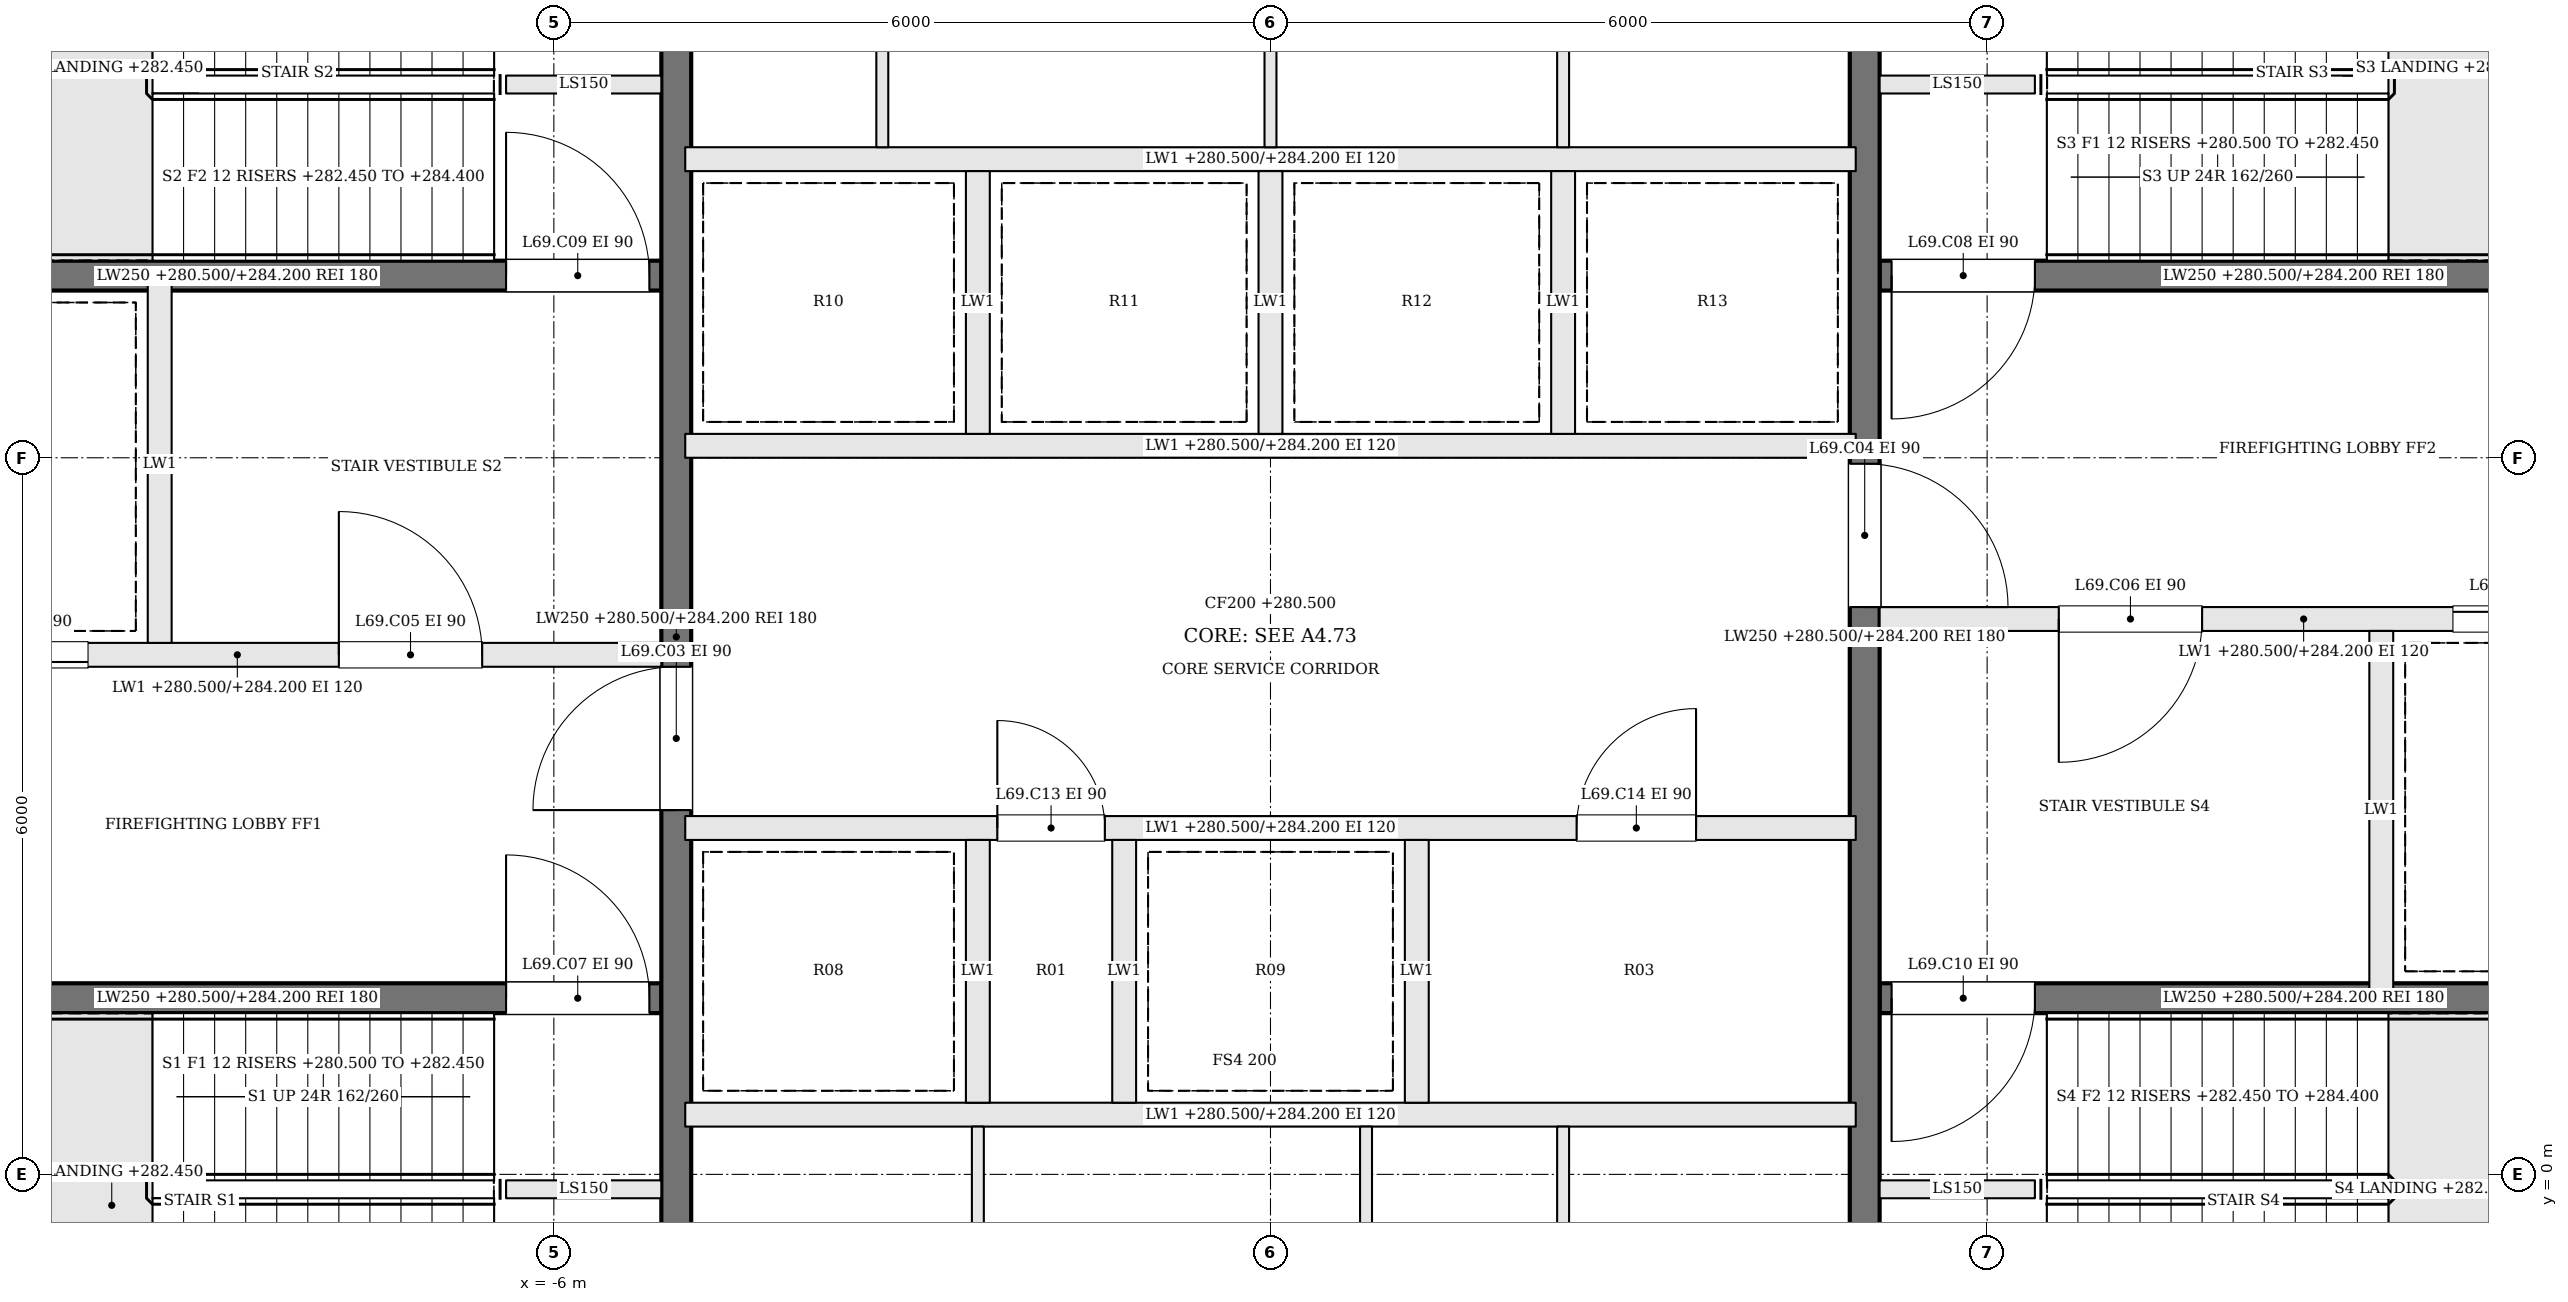
"""IFC4 building model, lengths in metres.
Left out: names, types, materials, properties, quantities, classifications, styles, units other than length and angle.
Written with IfcOpenShell. Run it as: python <this file> out.ifc"""

import sys

from ifc_helpers import new_model, si_unit, direction, frame, frame_2d, origin, place, context, subcontext, project, spatial, rectangle, extrude, element, fill, save


model = new_model("IFC4")
c1 = context("Model", 3, precision=1e-05, world=origin(), true_north=direction((0.0, 1.0)))
c2 = subcontext(c1, "Body", "Model", "MODEL_VIEW")
j1 = project(units=[si_unit("LENGTHUNIT", "METRE"), si_unit("PLANEANGLEUNIT", "RADIAN")], contexts=[c1])
p1 = place(None, origin())
s1 = spatial("IfcSite", under=j1, at=p1, CompositionType="ELEMENT")
p2 = place(p1, origin())
s2 = spatial("IfcBuilding", under=s1, at=p2, CompositionType="ELEMENT")
p3 = place(p2, frame((0.0, 0.0, 280.5)))
s3 = spatial("IfcBuildingStorey", under=s2, at=p3, CompositionType="ELEMENT", Elevation=280.5)
for number, where, z_axis, x_axis in (
    (1, (-6.4, -0.125, 0.0), (0.0, 0.0, 1.0), (1.0, 0.0, 0.0)),
    (2, (6.4, 9.125, 0.0), (0.0, 0.0, 1.0), (-1.0, 0.0, 0.0)),
    (3, (-6.4, 9.125, 0.0), (0.0, 0.0, 1.0), (1.0, 0.0, 0.0)),
    (4, (6.4, -0.125, 0.0), (0.0, 0.0, 1.0), (-1.0, 0.0, 0.0)),
):
    element("IfcWall", number, at=place(p3, frame(where, z_axis=z_axis, x_axis=x_axis)), inside=s3, PredefinedType="SOLIDWALL", context=c2, shape_type="SweptSolid", body=[
        extrude(rectangle(XDim=1.3, YDim=0.15, at=frame_2d((0.65, 0.0))), origin(), (0.0, 0.0, 1.0), 3.7),
    ])
p4 = place(p3, frame((-12.2, 1.475, 0.0), z_axis=(0.0, 0.0, 1.0), x_axis=(1.0, 0.0, 0.0)))
e5 = element("IfcWall", 5, at=p4, inside=s3, PredefinedType="SOLIDWALL", context=c2, shape_type="SweptSolid", body=[
    extrude(rectangle(XDim=7.1, YDim=0.25, at=frame_2d((3.55, 0.0))), origin(), (0.0, 0.0, 1.0), 3.7),
])
p5 = place(p4, frame((5.8, 0.0, 0.0)))
e6 = element("IfcOpeningElement", 6, at=p5, cuts=e5, PredefinedType="OPENING", context=c2, shape_type="SweptSolid", body=[
    extrude(rectangle(XDim=1.2, YDim=2.1, at=frame_2d((0.6, 1.05))), frame((0.0, 0.135, 0.0), z_axis=(0.0, -1.0, 0.0), x_axis=(1.0, 0.0, 0.0)), (0.0, 0.0, 1.0), 0.27),
])
p6 = place(p3, frame((12.2, 7.525, 0.0), z_axis=(0.0, 0.0, 1.0), x_axis=(-1.0, 0.0, 0.0)))
e7 = element("IfcWall", 7, at=p6, inside=s3, PredefinedType="SOLIDWALL", context=c2, shape_type="SweptSolid", body=[
    extrude(rectangle(XDim=7.1, YDim=0.25, at=frame_2d((3.55, 0.0))), origin(), (0.0, 0.0, 1.0), 3.7),
])
p7 = place(p6, frame((5.8, 0.0, 0.0)))
e8 = element("IfcOpeningElement", 8, at=p7, cuts=e7, PredefinedType="OPENING", context=c2, shape_type="SweptSolid", body=[
    extrude(rectangle(XDim=1.2, YDim=2.1, at=frame_2d((0.6, 1.05))), frame((0.0, 0.135, 0.0), z_axis=(0.0, -1.0, 0.0), x_axis=(1.0, 0.0, 0.0)), (0.0, 0.0, 1.0), 0.27),
])
p8 = place(p3, frame((-12.2, 4.35, 0.0), z_axis=(0.0, 0.0, 1.0), x_axis=(1.0, 0.0, 0.0)))
e9 = element("IfcWall", 9, at=p8, inside=s3, PredefinedType="SOLIDWALL", context=c2, shape_type="SweptSolid", body=[
    extrude(rectangle(XDim=7.1, YDim=0.2, at=frame_2d((3.55, 0.0))), origin(), (0.0, 0.0, 1.0), 3.7),
])
p9 = place(p8, frame((4.4, 0.0, 0.0)))
e10 = element("IfcOpeningElement", 10, at=p9, cuts=e9, PredefinedType="OPENING", context=c2, shape_type="SweptSolid", body=[
    extrude(rectangle(XDim=1.2, YDim=2.1, at=frame_2d((0.6, 1.05))), frame((0.0, 0.11, 0.0), z_axis=(0.0, -1.0, 0.0), x_axis=(1.0, 0.0, 0.0)), (0.0, 0.0, 1.0), 0.22),
])
p10 = place(p8, frame((1.1, 0.0, 0.0)))
e11 = element("IfcOpeningElement", 11, at=p10, cuts=e9, PredefinedType="OPENING", context=c2, shape_type="SweptSolid", body=[
    extrude(rectangle(XDim=1.2, YDim=2.1, at=frame_2d((0.6, 1.05))), frame((0.0, 0.11, 0.0), z_axis=(0.0, -1.0, 0.0), x_axis=(1.0, 0.0, 0.0)), (0.0, 0.0, 1.0), 0.22),
])
p11 = place(p3, frame((12.2, 4.65, 0.0), z_axis=(0.0, 0.0, 1.0), x_axis=(-1.0, 0.0, 0.0)))
e12 = element("IfcWall", 12, at=p11, inside=s3, PredefinedType="SOLIDWALL", context=c2, shape_type="SweptSolid", body=[
    extrude(rectangle(XDim=7.1, YDim=0.2, at=frame_2d((3.55, 0.0))), origin(), (0.0, 0.0, 1.0), 3.7),
])
p12 = place(p11, frame((4.4, 0.0, 0.0)))
e13 = element("IfcOpeningElement", 13, at=p12, cuts=e12, PredefinedType="OPENING", context=c2, shape_type="SweptSolid", body=[
    extrude(rectangle(XDim=1.2, YDim=2.1, at=frame_2d((0.6, 1.05))), frame((0.0, 0.11, 0.0), z_axis=(0.0, -1.0, 0.0), x_axis=(1.0, 0.0, 0.0)), (0.0, 0.0, 1.0), 0.22),
])
p13 = place(p11, frame((1.1, 0.0, 0.0)))
e14 = element("IfcOpeningElement", 14, at=p13, cuts=e12, PredefinedType="OPENING", context=c2, shape_type="SweptSolid", body=[
    extrude(rectangle(XDim=1.2, YDim=2.1, at=frame_2d((0.6, 1.05))), frame((0.0, 0.11, 0.0), z_axis=(0.0, -1.0, 0.0), x_axis=(1.0, 0.0, 0.0)), (0.0, 0.0, 1.0), 0.22),
])
p14 = place(p3, frame((-12.2, 7.525, 0.0), z_axis=(0.0, 0.0, 1.0), x_axis=(1.0, 0.0, 0.0)))
e15 = element("IfcWall", 15, at=p14, inside=s3, PredefinedType="SOLIDWALL", context=c2, shape_type="SweptSolid", body=[
    extrude(rectangle(XDim=7.1, YDim=0.25, at=frame_2d((3.55, 0.0))), origin(), (0.0, 0.0, 1.0), 3.7),
])
p15 = place(p14, frame((5.8, 0.0, 0.0)))
e16 = element("IfcOpeningElement", 16, at=p15, cuts=e15, PredefinedType="OPENING", context=c2, shape_type="SweptSolid", body=[
    extrude(rectangle(XDim=1.2, YDim=2.1, at=frame_2d((0.6, 1.05))), frame((0.0, 0.135, 0.0), z_axis=(0.0, -1.0, 0.0), x_axis=(1.0, 0.0, 0.0)), (0.0, 0.0, 1.0), 0.27),
])
p16 = place(p3, frame((12.2, 1.475, 0.0), z_axis=(0.0, 0.0, 1.0), x_axis=(-1.0, 0.0, 0.0)))
e17 = element("IfcWall", 17, at=p16, inside=s3, PredefinedType="SOLIDWALL", context=c2, shape_type="SweptSolid", body=[
    extrude(rectangle(XDim=7.1, YDim=0.25, at=frame_2d((3.55, 0.0))), origin(), (0.0, 0.0, 1.0), 3.7),
])
p17 = place(p16, frame((5.8, 0.0, 0.0)))
e18 = element("IfcOpeningElement", 18, at=p17, cuts=e17, PredefinedType="OPENING", context=c2, shape_type="SweptSolid", body=[
    extrude(rectangle(XDim=1.2, YDim=2.1, at=frame_2d((0.6, 1.05))), frame((0.0, 0.135, 0.0), z_axis=(0.0, -1.0, 0.0), x_axis=(1.0, 0.0, 0.0)), (0.0, 0.0, 1.0), 0.27),
])
for number, where, z_axis, x_axis in (
    (19, (-9.3, 4.45, 0.0), (0.0, 0.0, 1.0), (0.0, 1.0, 0.0)),
    (20, (9.3, 4.55, 0.0), (0.0, 0.0, 1.0), (0.0, -1.0, 0.0)),
):
    element("IfcWall", number, at=place(p3, frame(where, z_axis=z_axis, x_axis=x_axis)), inside=s3, PredefinedType="SOLIDWALL", context=c2, shape_type="SweptSolid", body=[
        extrude(rectangle(XDim=3.0, YDim=0.2, at=frame_2d((1.5, 0.0))), origin(), (0.0, 0.0, 1.0), 3.7),
    ])
p18 = place(p3, frame((-4.975, -2.2, 0.0), z_axis=(0.0, 0.0, 1.0), x_axis=(0.0, 1.0, 0.0)))
e21 = element("IfcWall", 21, at=p18, inside=s3, PredefinedType="SOLIDWALL", context=c2, shape_type="SweptSolid", body=[
    extrude(rectangle(XDim=13.4, YDim=0.25, at=frame_2d((6.7, 0.0))), origin(), (0.0, 0.0, 1.0), 3.7),
])
p19 = place(p18, frame((5.25, 0.0, 0.0)))
e22 = element("IfcOpeningElement", 22, at=p19, cuts=e21, PredefinedType="OPENING", context=c2, shape_type="SweptSolid", body=[
    extrude(rectangle(XDim=1.2, YDim=2.1, at=frame_2d((0.6, 1.05))), frame((0.0, 0.135, 0.0), z_axis=(0.0, -1.0, 0.0), x_axis=(1.0, 0.0, 0.0)), (0.0, 0.0, 1.0), 0.27),
])
p20 = place(p3, frame((4.975, 11.2, 0.0), z_axis=(0.0, 0.0, 1.0), x_axis=(0.0, -1.0, 0.0)))
e23 = element("IfcWall", 23, at=p20, inside=s3, PredefinedType="SOLIDWALL", context=c2, shape_type="SweptSolid", body=[
    extrude(rectangle(XDim=13.4, YDim=0.25, at=frame_2d((6.7, 0.0))), origin(), (0.0, 0.0, 1.0), 3.7),
])
p21 = place(p20, frame((5.25, 0.0, 0.0)))
e24 = element("IfcOpeningElement", 24, at=p21, cuts=e23, PredefinedType="OPENING", context=c2, shape_type="SweptSolid", body=[
    extrude(rectangle(XDim=1.2, YDim=2.1, at=frame_2d((0.6, 1.05))), frame((0.0, 0.135, 0.0), z_axis=(0.0, -1.0, 0.0), x_axis=(1.0, 0.0, 0.0)), (0.0, 0.0, 1.0), 0.27),
])
p22 = place(p3, frame((-4.9, 0.5, 0.0), z_axis=(0.0, 0.0, 1.0), x_axis=(1.0, 0.0, 0.0)))
e25 = element("IfcWall", 25, at=p22, inside=s3, PredefinedType="SOLIDWALL", context=c2, shape_type="SweptSolid", body=[
    extrude(rectangle(XDim=9.8, YDim=0.2, at=frame_2d((4.9, 0.0))), origin(), (0.0, 0.0, 1.0), 3.7),
])
p23 = place(p3, frame((-4.9, 2.9, 0.0), z_axis=(0.0, 0.0, 1.0), x_axis=(1.0, 0.0, 0.0)))
e26 = element("IfcWall", 26, at=p23, inside=s3, PredefinedType="SOLIDWALL", context=c2, shape_type="SweptSolid", body=[
    extrude(rectangle(XDim=9.8, YDim=0.2, at=frame_2d((4.9, 0.0))), origin(), (0.0, 0.0, 1.0), 3.7),
])
p24 = place(p23, frame((2.613, 0.0, 0.0)))
e27 = element("IfcOpeningElement", 27, at=p24, cuts=e26, PredefinedType="OPENING", context=c2, shape_type="SweptSolid", body=[
    extrude(rectangle(XDim=0.9, YDim=2.1, at=frame_2d((0.45, 1.05))), frame((0.0, 0.11, 0.0), z_axis=(0.0, -1.0, 0.0), x_axis=(1.0, 0.0, 0.0)), (0.0, 0.0, 1.0), 0.22),
])
p25 = place(p23, frame((7.463, 0.0, 0.0)))
e28 = element("IfcOpeningElement", 28, at=p25, cuts=e26, PredefinedType="OPENING", context=c2, shape_type="SweptSolid", body=[
    extrude(rectangle(XDim=1.0, YDim=2.1, at=frame_2d((0.5, 1.05))), frame((0.0, 0.11, 0.0), z_axis=(0.0, -1.0, 0.0), x_axis=(1.0, 0.0, 0.0)), (0.0, 0.0, 1.0), 0.22),
])
for number, where, z_axis, x_axis in (
    (29, (-4.9, 6.1, 0.0), (0.0, 0.0, 1.0), (1.0, 0.0, 0.0)),
    (30, (-4.9, 8.5, 0.0), (0.0, 0.0, 1.0), (1.0, 0.0, 0.0)),
):
    element("IfcWall", number, at=place(p3, frame(where, z_axis=z_axis, x_axis=x_axis)), inside=s3, PredefinedType="SOLIDWALL", context=c2, shape_type="SweptSolid", body=[
        extrude(rectangle(XDim=9.8, YDim=0.2, at=frame_2d((4.9, 0.0))), origin(), (0.0, 0.0, 1.0), 3.7),
    ])
for number, where, z_axis, x_axis in (
    (31, (-2.45, 0.6, 0.0), (0.0, 0.0, 1.0), (0.0, 1.0, 0.0)),
    (32, (-1.225, 0.6, 0.0), (0.0, 0.0, 1.0), (0.0, 1.0, 0.0)),
    (33, (1.225, 0.6, 0.0), (0.0, 0.0, 1.0), (0.0, 1.0, 0.0)),
    (34, (-2.45, 6.2, 0.0), (0.0, 0.0, 1.0), (0.0, 1.0, 0.0)),
    (35, (0.0, 6.2, 0.0), (0.0, 0.0, 1.0), (0.0, 1.0, 0.0)),
    (36, (2.45, 6.2, 0.0), (0.0, 0.0, 1.0), (0.0, 1.0, 0.0)),
):
    element("IfcWall", number, at=place(p3, frame(where, z_axis=z_axis, x_axis=x_axis)), inside=s3, PredefinedType="SOLIDWALL", context=c2, shape_type="SweptSolid", body=[
        extrude(rectangle(XDim=2.2, YDim=0.2, at=frame_2d((1.1, 0.0))), origin(), (0.0, 0.0, 1.0), 3.7),
    ])
for number, where, z_axis, x_axis in (
    (37, (-2.45, -2.2, 0.0), (0.0, 0.0, 1.0), (0.0, 1.0, 0.0)),
    (38, (0.8, -2.2, 0.0), (0.0, 0.0, 1.0), (0.0, 1.0, 0.0)),
    (39, (2.45, -2.2, 0.0), (0.0, 0.0, 1.0), (0.0, 1.0, 0.0)),
    (40, (-3.25, 8.6, 0.0), (0.0, 0.0, 1.0), (0.0, 1.0, 0.0)),
    (41, (0.0, 8.6, 0.0), (0.0, 0.0, 1.0), (0.0, 1.0, 0.0)),
    (42, (2.45, 8.6, 0.0), (0.0, 0.0, 1.0), (0.0, 1.0, 0.0)),
):
    element("IfcWall", number, at=place(p3, frame(where, z_axis=z_axis, x_axis=x_axis)), inside=s3, PredefinedType="PARTITIONING", context=c2, shape_type="SweptSolid", body=[
        extrude(rectangle(XDim=2.6, YDim=0.1, at=frame_2d((1.3, 0.0))), origin(), (0.0, 0.0, 1.0), 3.7),
    ])
p26 = place(p19, origin())
e43 = element("IfcDoor", 43, at=p26, inside=s3, OperationType="SINGLE_SWING_LEFT", PredefinedType="DOOR", context=c2, shape_type="SweptSolid", body=[
    extrude(rectangle(XDim=1.2, YDim=2.1, at=frame_2d((0.6, 1.05))), frame((0.0, 0.025, 0.0), z_axis=(0.0, -1.0, 0.0), x_axis=(1.0, 0.0, 0.0)), (0.0, 0.0, 1.0), 0.05),
])
fill(e22, e43)
p27 = place(p21, origin())
e44 = element("IfcDoor", 44, at=p27, inside=s3, OperationType="SINGLE_SWING_RIGHT", PredefinedType="DOOR", context=c2, shape_type="SweptSolid", body=[
    extrude(rectangle(XDim=1.2, YDim=2.1, at=frame_2d((0.6, 1.05))), frame((0.0, 0.025, 0.0), z_axis=(0.0, -1.0, 0.0), x_axis=(1.0, 0.0, 0.0)), (0.0, 0.0, 1.0), 0.05),
])
fill(e24, e44)
p28 = place(p9, origin())
e45 = element("IfcDoor", 45, at=p28, inside=s3, OperationType="SINGLE_SWING_LEFT", PredefinedType="DOOR", context=c2, shape_type="SweptSolid", body=[
    extrude(rectangle(XDim=1.2, YDim=2.1, at=frame_2d((0.6, 1.05))), frame((0.0, 0.025, 0.0), z_axis=(0.0, -1.0, 0.0), x_axis=(1.0, 0.0, 0.0)), (0.0, 0.0, 1.0), 0.05),
])
fill(e10, e45)
p29 = place(p12, origin())
e46 = element("IfcDoor", 46, at=p29, inside=s3, OperationType="SINGLE_SWING_RIGHT", PredefinedType="DOOR", context=c2, shape_type="SweptSolid", body=[
    extrude(rectangle(XDim=1.2, YDim=2.1, at=frame_2d((0.6, 1.05))), frame((0.0, 0.025, 0.0), z_axis=(0.0, -1.0, 0.0), x_axis=(1.0, 0.0, 0.0)), (0.0, 0.0, 1.0), 0.05),
])
fill(e13, e46)
p30 = place(p5, origin())
e47 = element("IfcDoor", 47, at=p30, inside=s3, OperationType="SINGLE_SWING_LEFT", PredefinedType="DOOR", context=c2, shape_type="SweptSolid", body=[
    extrude(rectangle(XDim=1.2, YDim=2.1, at=frame_2d((0.6, 1.05))), frame((0.0, 0.025, 0.0), z_axis=(0.0, -1.0, 0.0), x_axis=(1.0, 0.0, 0.0)), (0.0, 0.0, 1.0), 0.05),
])
fill(e6, e47)
p31 = place(p7, origin())
e48 = element("IfcDoor", 48, at=p31, inside=s3, OperationType="SINGLE_SWING_RIGHT", PredefinedType="DOOR", context=c2, shape_type="SweptSolid", body=[
    extrude(rectangle(XDim=1.2, YDim=2.1, at=frame_2d((0.6, 1.05))), frame((0.0, 0.025, 0.0), z_axis=(0.0, -1.0, 0.0), x_axis=(1.0, 0.0, 0.0)), (0.0, 0.0, 1.0), 0.05),
])
fill(e8, e48)
p32 = place(p15, origin())
e49 = element("IfcDoor", 49, at=p32, inside=s3, OperationType="SINGLE_SWING_LEFT", PredefinedType="DOOR", context=c2, shape_type="SweptSolid", body=[
    extrude(rectangle(XDim=1.2, YDim=2.1, at=frame_2d((0.6, 1.05))), frame((0.0, 0.025, 0.0), z_axis=(0.0, -1.0, 0.0), x_axis=(1.0, 0.0, 0.0)), (0.0, 0.0, 1.0), 0.05),
])
fill(e16, e49)
p33 = place(p17, origin())
e50 = element("IfcDoor", 50, at=p33, inside=s3, OperationType="SINGLE_SWING_RIGHT", PredefinedType="DOOR", context=c2, shape_type="SweptSolid", body=[
    extrude(rectangle(XDim=1.2, YDim=2.1, at=frame_2d((0.6, 1.05))), frame((0.0, 0.025, 0.0), z_axis=(0.0, -1.0, 0.0), x_axis=(1.0, 0.0, 0.0)), (0.0, 0.0, 1.0), 0.05),
])
fill(e18, e50)
p34 = place(p10, origin())
e51 = element("IfcDoor", 51, at=p34, inside=s3, OperationType="SLIDING_TO_RIGHT", PredefinedType="DOOR", context=c2, shape_type="SweptSolid", body=[
    extrude(rectangle(XDim=1.2, YDim=2.1, at=frame_2d((0.6, 1.05))), frame((0.0, 0.025, 0.0), z_axis=(0.0, -1.0, 0.0), x_axis=(1.0, 0.0, 0.0)), (0.0, 0.0, 1.0), 0.05),
])
fill(e11, e51)
p35 = place(p13, origin())
e52 = element("IfcDoor", 52, at=p35, inside=s3, OperationType="SLIDING_TO_RIGHT", PredefinedType="DOOR", context=c2, shape_type="SweptSolid", body=[
    extrude(rectangle(XDim=1.2, YDim=2.1, at=frame_2d((0.6, 1.05))), frame((0.0, 0.025, 0.0), z_axis=(0.0, -1.0, 0.0), x_axis=(1.0, 0.0, 0.0)), (0.0, 0.0, 1.0), 0.05),
])
fill(e14, e52)
p36 = place(p24, origin())
e53 = element("IfcDoor", 53, at=p36, inside=s3, OperationType="SINGLE_SWING_LEFT", PredefinedType="DOOR", context=c2, shape_type="SweptSolid", body=[
    extrude(rectangle(XDim=0.9, YDim=2.1, at=frame_2d((0.45, 1.05))), frame((0.0, 0.025, 0.0), z_axis=(0.0, -1.0, 0.0), x_axis=(1.0, 0.0, 0.0)), (0.0, 0.0, 1.0), 0.05),
])
fill(e27, e53)
p37 = place(p25, origin())
e54 = element("IfcDoor", 54, at=p37, inside=s3, OperationType="SINGLE_SWING_RIGHT", PredefinedType="DOOR", context=c2, shape_type="SweptSolid", body=[
    extrude(rectangle(XDim=1.0, YDim=2.1, at=frame_2d((0.5, 1.05))), frame((0.0, 0.025, 0.0), z_axis=(0.0, -1.0, 0.0), x_axis=(1.0, 0.0, 0.0)), (0.0, 0.0, 1.0), 0.05),
])
fill(e28, e54)
save(model, sys.argv[1])
